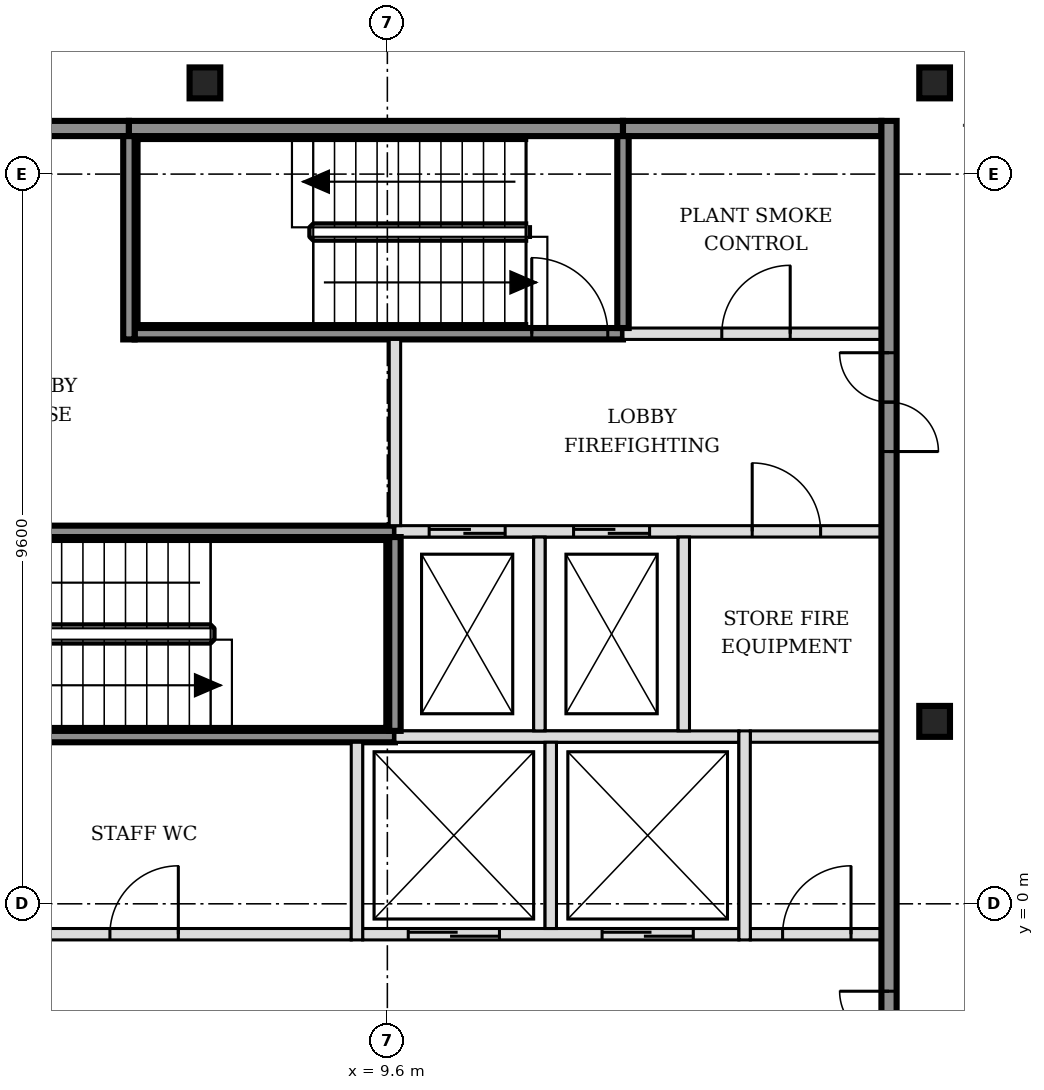
"""IFC4 building model, lengths in metres.
Left out: names, types, materials, properties, quantities, classifications, styles, units other than length and angle.
Written with IfcOpenShell. Run it as: python <this file> out.ifc"""

import sys

from ifc_helpers import new_model, si_unit, direction, frame, frame_2d, origin, origin_2d, place, context, subcontext, project, spatial, rectangle, i_section, extrude, element, fill, save


model = new_model("IFC4")
c1 = context("Model", 3, precision=1e-05, world=origin(), true_north=direction((0.0, 1.0)))
c2 = subcontext(c1, "Body", "Model", "MODEL_VIEW")
j1 = project(units=[si_unit("LENGTHUNIT", "METRE"), si_unit("PLANEANGLEUNIT", "RADIAN")], contexts=[c1])
p1 = place(None, origin())
s1 = spatial("IfcSite", under=j1, at=p1, CompositionType="ELEMENT")
p2 = place(p1, origin())
s2 = spatial("IfcBuilding", under=s1, at=p2, CompositionType="ELEMENT")
p3 = place(p2, frame((0.0, 0.0, 225.0)))
s3 = spatial("IfcBuildingStorey", under=s2, at=p3, CompositionType="ELEMENT", Elevation=225.0)
for number, where, z_axis, x_axis in (
    (1, (16.8, 2.4, -0.15), (0.0, 0.0, 1.0), (1.0, 0.0, 0.0)),
    (2, (7.2, 10.8, -0.15), (0.0, 0.0, 1.0), (1.0, 0.0, 0.0)),
    (3, (16.8, 10.8, -0.15), (0.0, 0.0, 1.0), (1.0, 0.0, 0.0)),
):
    element("IfcColumn", number, at=place(p3, frame(where, z_axis=z_axis, x_axis=x_axis)), inside=s3, PredefinedType="COLUMN", context=c2, shape_type="SweptSolid", body=[
        extrude(i_section(OverallWidth=0.404, OverallDepth=0.407, WebThickness=0.027, FlangeThickness=0.044, FilletRadius=0.015, at=origin_2d()), origin(), (0.0, 0.0, 1.0), 3.6),
    ])
p4 = place(p3, frame((-1.7, -0.4, 0.0), z_axis=(0.0, 0.0, 1.0), x_axis=(1.0, 0.0, 0.0)))
e4 = element("IfcWall", 4, at=p4, inside=s3, PredefinedType="PARTITIONING", context=c2, shape_type="SweptSolid", body=[
    extrude(rectangle(XDim=10.825, YDim=0.15, at=frame_2d((5.413, 0.0))), origin(), (0.0, 0.0, 1.0), 3.45),
])
p5 = place(p4, frame((2.15, 0.0, 0.0)))
e5 = element("IfcOpeningElement", 5, at=p5, cuts=e4, PredefinedType="OPENING", context=c2, shape_type="SweptSolid", body=[
    extrude(rectangle(XDim=0.9, YDim=2.1, at=frame_2d((0.45, 1.05))), frame((0.0, 0.085, 0.0), z_axis=(0.0, -1.0, 0.0), x_axis=(1.0, 0.0, 0.0)), (0.0, 0.0, 1.0), 0.17),
])
p6 = place(p4, frame((7.65, 0.0, 0.0)))
e6 = element("IfcOpeningElement", 6, at=p6, cuts=e4, PredefinedType="OPENING", context=c2, shape_type="SweptSolid", body=[
    extrude(rectangle(XDim=0.9, YDim=2.1, at=frame_2d((0.45, 1.05))), frame((0.0, 0.085, 0.0), z_axis=(0.0, -1.0, 0.0), x_axis=(1.0, 0.0, 0.0)), (0.0, 0.0, 1.0), 0.17),
])
p7 = place(p3, frame((9.275, -0.4, 0.0), z_axis=(0.0, 0.0, 1.0), x_axis=(1.0, 0.0, 0.0)))
e7 = element("IfcWall", 7, at=p7, inside=s3, PredefinedType="SOLIDWALL", context=c2, shape_type="SweptSolid", body=[
    extrude(rectangle(XDim=4.95, YDim=0.15, at=frame_2d((2.475, 0.0))), origin(), (0.0, 0.0, 1.0), 3.45),
])
p8 = place(p7, frame((0.6, 0.0, 0.0)))
e8 = element("IfcOpeningElement", 8, at=p8, cuts=e7, PredefinedType="OPENING", context=c2, shape_type="SweptSolid", body=[
    extrude(rectangle(XDim=1.2, YDim=2.1, at=frame_2d((0.6, 1.05))), frame((0.0, 0.085, 0.0), z_axis=(0.0, -1.0, 0.0), x_axis=(1.0, 0.0, 0.0)), (0.0, 0.0, 1.0), 0.17),
])
p9 = place(p7, frame((3.15, 0.0, 0.0)))
e9 = element("IfcOpeningElement", 9, at=p9, cuts=e7, PredefinedType="OPENING", context=c2, shape_type="SweptSolid", body=[
    extrude(rectangle(XDim=1.2, YDim=2.1, at=frame_2d((0.6, 1.05))), frame((0.0, 0.085, 0.0), z_axis=(0.0, -1.0, 0.0), x_axis=(1.0, 0.0, 0.0)), (0.0, 0.0, 1.0), 0.17),
])
p10 = place(p3, frame((14.375, -0.4, 0.0), z_axis=(0.0, 0.0, 1.0), x_axis=(1.0, 0.0, 0.0)))
e10 = element("IfcWall", 10, at=p10, inside=s3, PredefinedType="PARTITIONING", context=c2, shape_type="SweptSolid", body=[
    extrude(rectangle(XDim=1.725, YDim=0.15, at=frame_2d((0.863, 0.0))), origin(), (0.0, 0.0, 1.0), 3.45),
])
p11 = place(p10, frame((0.425, 0.0, 0.0)))
e11 = element("IfcOpeningElement", 11, at=p11, cuts=e10, PredefinedType="OPENING", context=c2, shape_type="SweptSolid", body=[
    extrude(rectangle(XDim=0.9, YDim=2.1, at=frame_2d((0.45, 1.05))), frame((0.0, 0.085, 0.0), z_axis=(0.0, -1.0, 0.0), x_axis=(1.0, 0.0, 0.0)), (0.0, 0.0, 1.0), 0.17),
])
p12 = place(p3, frame((3.2, 2.2, 0.0), z_axis=(0.0, 0.0, 1.0), x_axis=(1.0, 0.0, 0.0)))
e12 = element("IfcWall", 12, at=p12, inside=s3, PredefinedType="SOLIDWALL", context=c2, shape_type="SweptSolid", body=[
    extrude(rectangle(XDim=6.5, YDim=0.15, at=frame_2d((3.25, 0.0))), origin(), (0.0, 0.0, 1.0), 3.45),
])
p13 = place(p3, frame((9.7, 2.2, 0.0), z_axis=(0.0, 0.0, 1.0), x_axis=(1.0, 0.0, 0.0)))
e13 = element("IfcWall", 13, at=p13, inside=s3, PredefinedType="SOLIDWALL", context=c2, shape_type="SweptSolid", body=[
    extrude(rectangle(XDim=4.525, YDim=0.15, at=frame_2d((2.263, 0.0))), origin(), (0.0, 0.0, 1.0), 3.45),
])
p14 = place(p3, frame((14.375, 2.2, 0.0), z_axis=(0.0, 0.0, 1.0), x_axis=(1.0, 0.0, 0.0)))
e14 = element("IfcWall", 14, at=p14, inside=s3, PredefinedType="PARTITIONING", context=c2, shape_type="SweptSolid", body=[
    extrude(rectangle(XDim=1.725, YDim=0.15, at=frame_2d((0.863, 0.0))), origin(), (0.0, 0.0, 1.0), 3.45),
])
p15 = place(p3, frame((3.2, 4.9, 0.0), z_axis=(0.0, 0.0, 1.0), x_axis=(1.0, 0.0, 0.0)))
e15 = element("IfcWall", 15, at=p15, inside=s3, PredefinedType="SOLIDWALL", context=c2, shape_type="SweptSolid", body=[
    extrude(rectangle(XDim=6.5, YDim=0.15, at=frame_2d((3.25, 0.0))), origin(), (0.0, 0.0, 1.0), 3.45),
])
p16 = place(p15, frame((0.175, 0.0, 0.0)))
e16 = element("IfcOpeningElement", 16, at=p16, cuts=e15, PredefinedType="OPENING", context=c2, shape_type="SweptSolid", body=[
    extrude(rectangle(XDim=1.0, YDim=2.1, at=frame_2d((0.5, 1.05))), frame((0.0, 0.085, 0.0), z_axis=(0.0, -1.0, 0.0), x_axis=(1.0, 0.0, 0.0)), (0.0, 0.0, 1.0), 0.17),
])
p17 = place(p3, frame((9.7, 4.9, 0.0), z_axis=(0.0, 0.0, 1.0), x_axis=(1.0, 0.0, 0.0)))
e17 = element("IfcWall", 17, at=p17, inside=s3, PredefinedType="SOLIDWALL", context=c2, shape_type="SweptSolid", body=[
    extrude(rectangle(XDim=6.4, YDim=0.15, at=frame_2d((3.2, 0.0))), origin(), (0.0, 0.0, 1.0), 3.45),
])
p18 = place(p17, frame((0.45, 0.0, 0.0)))
e18 = element("IfcOpeningElement", 18, at=p18, cuts=e17, PredefinedType="OPENING", context=c2, shape_type="SweptSolid", body=[
    extrude(rectangle(XDim=1.0, YDim=2.1, at=frame_2d((0.5, 1.05))), frame((0.0, 0.085, 0.0), z_axis=(0.0, -1.0, 0.0), x_axis=(1.0, 0.0, 0.0)), (0.0, 0.0, 1.0), 0.17),
])
p19 = place(p17, frame((2.35, 0.0, 0.0)))
e19 = element("IfcOpeningElement", 19, at=p19, cuts=e17, PredefinedType="OPENING", context=c2, shape_type="SweptSolid", body=[
    extrude(rectangle(XDim=1.0, YDim=2.1, at=frame_2d((0.5, 1.05))), frame((0.0, 0.085, 0.0), z_axis=(0.0, -1.0, 0.0), x_axis=(1.0, 0.0, 0.0)), (0.0, 0.0, 1.0), 0.17),
])
p20 = place(p17, frame((4.7, 0.0, 0.0)))
e20 = element("IfcOpeningElement", 20, at=p20, cuts=e17, PredefinedType="OPENING", context=c2, shape_type="SweptSolid", body=[
    extrude(rectangle(XDim=0.9, YDim=2.1, at=frame_2d((0.45, 1.05))), frame((0.0, 0.085, 0.0), z_axis=(0.0, -1.0, 0.0), x_axis=(1.0, 0.0, 0.0)), (0.0, 0.0, 1.0), 0.17),
])
p21 = place(p3, frame((6.275, 7.5, 0.0), z_axis=(0.0, 0.0, 1.0), x_axis=(1.0, 0.0, 0.0)))
e21 = element("IfcWall", 21, at=p21, inside=s3, PredefinedType="SOLIDWALL", context=c2, shape_type="SweptSolid", body=[
    extrude(rectangle(XDim=6.425, YDim=0.15, at=frame_2d((3.212, 0.0))), origin(), (0.0, 0.0, 1.0), 3.45),
])
p22 = place(p21, frame((5.225, 0.0, 0.0)))
e22 = element("IfcOpeningElement", 22, at=p22, cuts=e21, PredefinedType="OPENING", context=c2, shape_type="SweptSolid", body=[
    extrude(rectangle(XDim=1.0, YDim=2.1, at=frame_2d((0.5, 1.05))), frame((0.0, 0.085, 0.0), z_axis=(0.0, -1.0, 0.0), x_axis=(1.0, 0.0, 0.0)), (0.0, 0.0, 1.0), 0.17),
])
p23 = place(p3, frame((12.7, 7.5, 0.0), z_axis=(0.0, 0.0, 1.0), x_axis=(1.0, 0.0, 0.0)))
e23 = element("IfcWall", 23, at=p23, inside=s3, PredefinedType="SOLIDWALL", context=c2, shape_type="SweptSolid", body=[
    extrude(rectangle(XDim=3.4, YDim=0.15, at=frame_2d((1.7, 0.0))), origin(), (0.0, 0.0, 1.0), 3.45),
])
p24 = place(p23, frame((1.3, 0.0, 0.0)))
e24 = element("IfcOpeningElement", 24, at=p24, cuts=e23, PredefinedType="OPENING", context=c2, shape_type="SweptSolid", body=[
    extrude(rectangle(XDim=0.9, YDim=2.1, at=frame_2d((0.45, 1.05))), frame((0.0, 0.085, 0.0), z_axis=(0.0, -1.0, 0.0), x_axis=(1.0, 0.0, 0.0)), (0.0, 0.0, 1.0), 0.17),
])
p25 = place(p3, frame((-1.7, 10.2, 0.0), z_axis=(0.0, 0.0, 1.0), x_axis=(1.0, 0.0, 0.0)))
e25 = element("IfcWall", 25, at=p25, inside=s3, PredefinedType="SOLIDWALL", context=c2, shape_type="SweptSolid", body=[
    extrude(rectangle(XDim=7.9, YDim=0.2, at=frame_2d((3.95, 0.0))), origin(), (0.0, 0.0, 1.0), 3.45),
])
p26 = place(p3, frame((6.2, 10.2, 0.0), z_axis=(0.0, 0.0, 1.0), x_axis=(1.0, 0.0, 0.0)))
e26 = element("IfcWall", 26, at=p26, inside=s3, PredefinedType="SOLIDWALL", context=c2, shape_type="SweptSolid", body=[
    extrude(rectangle(XDim=6.5, YDim=0.2, at=frame_2d((3.25, 0.0))), origin(), (0.0, 0.0, 1.0), 3.45),
])
p27 = place(p3, frame((12.7, 10.2, 0.0), z_axis=(0.0, 0.0, 1.0), x_axis=(1.0, 0.0, 0.0)))
e27 = element("IfcWall", 27, at=p27, inside=s3, PredefinedType="SOLIDWALL", context=c2, shape_type="SweptSolid", body=[
    extrude(rectangle(XDim=3.4, YDim=0.2, at=frame_2d((1.7, 0.0))), origin(), (0.0, 0.0, 1.0), 3.45),
])
p28 = place(p3, frame((6.2, 7.425, 0.0), z_axis=(0.0, 0.0, 1.0), x_axis=(0.0, 1.0, 0.0)))
e28 = element("IfcWall", 28, at=p28, inside=s3, PredefinedType="SOLIDWALL", context=c2, shape_type="SweptSolid", body=[
    extrude(rectangle(XDim=2.675, YDim=0.15, at=frame_2d((1.337, 0.0))), origin(), (0.0, 0.0, 1.0), 3.45),
])
p29 = place(p3, frame((9.2, -0.475, 0.0), z_axis=(0.0, 0.0, 1.0), x_axis=(0.0, 1.0, 0.0)))
e29 = element("IfcWall", 29, at=p29, inside=s3, PredefinedType="SOLIDWALL", context=c2, shape_type="SweptSolid", body=[
    extrude(rectangle(XDim=2.6, YDim=0.15, at=frame_2d((1.3, 0.0))), origin(), (0.0, 0.0, 1.0), 3.45),
])
p30 = place(p3, frame((9.7, 2.275, 0.0), z_axis=(0.0, 0.0, 1.0), x_axis=(0.0, 1.0, 0.0)))
e30 = element("IfcWall", 30, at=p30, inside=s3, PredefinedType="SOLIDWALL", context=c2, shape_type="SweptSolid", body=[
    extrude(rectangle(XDim=2.55, YDim=0.15, at=frame_2d((1.275, 0.0))), origin(), (0.0, 0.0, 1.0), 3.45),
])
p31 = place(p3, frame((9.7, 4.975, 0.0), z_axis=(0.0, 0.0, 1.0), x_axis=(0.0, 1.0, 0.0)))
e31 = element("IfcWall", 31, at=p31, inside=s3, PredefinedType="SOLIDWALL", context=c2, shape_type="SweptSolid", body=[
    extrude(rectangle(XDim=2.45, YDim=0.15, at=frame_2d((1.225, 0.0))), origin(), (0.0, 0.0, 1.0), 3.45),
])
p32 = place(p3, frame((11.6, 2.275, 0.0), z_axis=(0.0, 0.0, 1.0), x_axis=(0.0, 1.0, 0.0)))
e32 = element("IfcWall", 32, at=p32, inside=s3, PredefinedType="SOLIDWALL", context=c2, shape_type="SweptSolid", body=[
    extrude(rectangle(XDim=2.55, YDim=0.15, at=frame_2d((1.275, 0.0))), origin(), (0.0, 0.0, 1.0), 3.45),
])
p33 = place(p3, frame((11.75, -0.325, 0.0), z_axis=(0.0, 0.0, 1.0), x_axis=(0.0, 1.0, 0.0)))
e33 = element("IfcWall", 33, at=p33, inside=s3, PredefinedType="SOLIDWALL", context=c2, shape_type="SweptSolid", body=[
    extrude(rectangle(XDim=2.45, YDim=0.15, at=frame_2d((1.225, 0.0))), origin(), (0.0, 0.0, 1.0), 3.45),
])
p34 = place(p3, frame((12.7, 7.575, 0.0), z_axis=(0.0, 0.0, 1.0), x_axis=(0.0, 1.0, 0.0)))
e34 = element("IfcWall", 34, at=p34, inside=s3, PredefinedType="SOLIDWALL", context=c2, shape_type="SweptSolid", body=[
    extrude(rectangle(XDim=2.525, YDim=0.15, at=frame_2d((1.263, 0.0))), origin(), (0.0, 0.0, 1.0), 3.45),
])
p35 = place(p3, frame((13.5, 2.275, 0.0), z_axis=(0.0, 0.0, 1.0), x_axis=(0.0, 1.0, 0.0)))
e35 = element("IfcWall", 35, at=p35, inside=s3, PredefinedType="SOLIDWALL", context=c2, shape_type="SweptSolid", body=[
    extrude(rectangle(XDim=2.55, YDim=0.15, at=frame_2d((1.275, 0.0))), origin(), (0.0, 0.0, 1.0), 3.45),
])
p36 = place(p3, frame((14.3, -0.475, 0.0), z_axis=(0.0, 0.0, 1.0), x_axis=(0.0, 1.0, 0.0)))
e36 = element("IfcWall", 36, at=p36, inside=s3, PredefinedType="SOLIDWALL", context=c2, shape_type="SweptSolid", body=[
    extrude(rectangle(XDim=2.75, YDim=0.15, at=frame_2d((1.375, 0.0))), origin(), (0.0, 0.0, 1.0), 3.45),
])
p37 = place(p3, frame((16.2, -5.5, 0.0), z_axis=(0.0, 0.0, 1.0), x_axis=(0.0, 1.0, 0.0)))
e37 = element("IfcWall", 37, at=p37, inside=s3, PredefinedType="SOLIDWALL", context=c2, shape_type="SweptSolid", body=[
    extrude(rectangle(XDim=15.8, YDim=0.2, at=frame_2d((7.9, 0.0))), origin(), (0.0, 0.0, 1.0), 3.45),
])
p38 = place(p37, frame((3.05, 0.0, 0.0)))
e38 = element("IfcOpeningElement", 38, at=p38, cuts=e37, PredefinedType="OPENING", context=c2, shape_type="SweptSolid", body=[
    extrude(rectangle(XDim=1.3, YDim=2.1, at=frame_2d((0.65, 1.05))), frame((0.0, 0.11, 0.0), z_axis=(0.0, -1.0, 0.0), x_axis=(1.0, 0.0, 0.0)), (0.0, 0.0, 1.0), 0.22),
])
p39 = place(p37, frame((11.45, 0.0, 0.0)))
e39 = element("IfcOpeningElement", 39, at=p39, cuts=e37, PredefinedType="OPENING", context=c2, shape_type="SweptSolid", body=[
    extrude(rectangle(XDim=1.3, YDim=2.1, at=frame_2d((0.65, 1.05))), frame((0.0, 0.11, 0.0), z_axis=(0.0, -1.0, 0.0), x_axis=(1.0, 0.0, 0.0)), (0.0, 0.0, 1.0), 0.22),
])
p40 = place(p3, frame((16.722, -14.272, 0.0), z_axis=(0.0, 0.0, 1.0), x_axis=(0.707106781187, 0.707106781187, 0.0)))
e40 = element("IfcWall", 40, at=p40, inside=s3, PredefinedType="PARTITIONING", context=c2, shape_type="SweptSolid", body=[
    extrude(rectangle(XDim=20.049, YDim=0.15, at=frame_2d((10.025, 0.0))), origin(), (0.0, 0.0, 1.0), 2.73),
])
p41 = place(p40, frame((4.892, 0.0, 0.0)))
e41 = element("IfcOpeningElement", 41, at=p41, cuts=e40, PredefinedType="OPENING", context=c2, shape_type="SweptSolid", body=[
    extrude(rectangle(XDim=0.9, YDim=2.1, at=frame_2d((0.45, 1.05))), frame((0.0, 0.085, 0.0), z_axis=(0.0, -1.0, 0.0), x_axis=(1.0, 0.0, 0.0)), (0.0, 0.0, 1.0), 0.17),
])
p42 = place(p40, frame((10.042, 0.0, 0.0)))
e42 = element("IfcOpeningElement", 42, at=p42, cuts=e40, PredefinedType="OPENING", context=c2, shape_type="SweptSolid", body=[
    extrude(rectangle(XDim=0.9, YDim=2.1, at=frame_2d((0.45, 1.05))), frame((0.0, 0.085, 0.0), z_axis=(0.0, -1.0, 0.0), x_axis=(1.0, 0.0, 0.0)), (0.0, 0.0, 1.0), 0.17),
])
p43 = place(p40, frame((14.443, 0.0, 0.0)))
e43 = element("IfcOpeningElement", 43, at=p43, cuts=e40, PredefinedType="OPENING", context=c2, shape_type="SweptSolid", body=[
    extrude(rectangle(XDim=0.9, YDim=2.1, at=frame_2d((0.45, 1.05))), frame((0.0, 0.085, 0.0), z_axis=(0.0, -1.0, 0.0), x_axis=(1.0, 0.0, 0.0)), (0.0, 0.0, 1.0), 0.17),
])
p44 = place(p40, frame((17.837, 0.0, 0.0)))
e44 = element("IfcOpeningElement", 44, at=p44, cuts=e40, PredefinedType="OPENING", context=c2, shape_type="SweptSolid", body=[
    extrude(rectangle(XDim=0.9, YDim=2.1, at=frame_2d((0.45, 1.05))), frame((0.0, 0.085, 0.0), z_axis=(0.0, -1.0, 0.0), x_axis=(1.0, 0.0, 0.0)), (0.0, 0.0, 1.0), 0.17),
])
p45 = place(p8, origin())
e45 = element("IfcDoor", 45, at=p45, inside=s3, OperationType="DOUBLE_DOOR_SLIDING", PredefinedType="DOOR", context=c2, shape_type="SweptSolid", body=[
    extrude(rectangle(XDim=1.2, YDim=2.1, at=frame_2d((0.6, 1.05))), frame((0.0, 0.025, 0.0), z_axis=(0.0, -1.0, 0.0), x_axis=(1.0, 0.0, 0.0)), (0.0, 0.0, 1.0), 0.05),
])
fill(e8, e45)
p46 = place(p9, origin())
e46 = element("IfcDoor", 46, at=p46, inside=s3, OperationType="DOUBLE_DOOR_SLIDING", PredefinedType="DOOR", context=c2, shape_type="SweptSolid", body=[
    extrude(rectangle(XDim=1.2, YDim=2.1, at=frame_2d((0.6, 1.05))), frame((0.0, 0.025, 0.0), z_axis=(0.0, -1.0, 0.0), x_axis=(1.0, 0.0, 0.0)), (0.0, 0.0, 1.0), 0.05),
])
fill(e9, e46)
p47 = place(p18, origin())
e47 = element("IfcDoor", 47, at=p47, inside=s3, OperationType="DOUBLE_DOOR_SLIDING", PredefinedType="DOOR", context=c2, shape_type="SweptSolid", body=[
    extrude(rectangle(XDim=1.0, YDim=2.1, at=frame_2d((0.5, 1.05))), frame((0.0, 0.025, 0.0), z_axis=(0.0, -1.0, 0.0), x_axis=(1.0, 0.0, 0.0)), (0.0, 0.0, 1.0), 0.05),
])
fill(e18, e47)
p48 = place(p19, origin())
e48 = element("IfcDoor", 48, at=p48, inside=s3, OperationType="DOUBLE_DOOR_SLIDING", PredefinedType="DOOR", context=c2, shape_type="SweptSolid", body=[
    extrude(rectangle(XDim=1.0, YDim=2.1, at=frame_2d((0.5, 1.05))), frame((0.0, 0.025, 0.0), z_axis=(0.0, -1.0, 0.0), x_axis=(1.0, 0.0, 0.0)), (0.0, 0.0, 1.0), 0.05),
])
fill(e19, e48)
p49 = place(p22, origin())
e49 = element("IfcDoor", 49, at=p49, inside=s3, OperationType="SINGLE_SWING_LEFT", PredefinedType="DOOR", context=c2, shape_type="SweptSolid", body=[
    extrude(rectangle(XDim=1.0, YDim=2.1, at=frame_2d((0.5, 1.05))), frame((0.0, 0.025, 0.0), z_axis=(0.0, -1.0, 0.0), x_axis=(1.0, 0.0, 0.0)), (0.0, 0.0, 1.0), 0.05),
])
fill(e22, e49)
p50 = place(p38, origin())
e50 = element("IfcDoor", 50, at=p50, inside=s3, OperationType="DOUBLE_DOOR_SINGLE_SWING", PredefinedType="DOOR", context=c2, shape_type="SweptSolid", body=[
    extrude(rectangle(XDim=1.3, YDim=2.1, at=frame_2d((0.65, 1.05))), frame((0.0, 0.025, 0.0), z_axis=(0.0, -1.0, 0.0), x_axis=(1.0, 0.0, 0.0)), (0.0, 0.0, 1.0), 0.05),
])
fill(e38, e50)
p51 = place(p39, origin())
e51 = element("IfcDoor", 51, at=p51, inside=s3, OperationType="DOUBLE_DOOR_SINGLE_SWING", PredefinedType="DOOR", context=c2, shape_type="SweptSolid", body=[
    extrude(rectangle(XDim=1.3, YDim=2.1, at=frame_2d((0.65, 1.05))), frame((0.0, 0.025, 0.0), z_axis=(0.0, -1.0, 0.0), x_axis=(1.0, 0.0, 0.0)), (0.0, 0.0, 1.0), 0.05),
])
fill(e39, e51)
p52 = place(p11, origin())
e52 = element("IfcDoor", 52, at=p52, inside=s3, OperationType="SINGLE_SWING_RIGHT", PredefinedType="DOOR", context=c2, shape_type="SweptSolid", body=[
    extrude(rectangle(XDim=0.9, YDim=2.1, at=frame_2d((0.45, 1.05))), frame((0.0, 0.025, 0.0), z_axis=(0.0, -1.0, 0.0), x_axis=(1.0, 0.0, 0.0)), (0.0, 0.0, 1.0), 0.05),
])
fill(e11, e52)
p53 = place(p20, origin())
e53 = element("IfcDoor", 53, at=p53, inside=s3, OperationType="SINGLE_SWING_LEFT", PredefinedType="DOOR", context=c2, shape_type="SweptSolid", body=[
    extrude(rectangle(XDim=0.9, YDim=2.1, at=frame_2d((0.45, 1.05))), frame((0.0, 0.025, 0.0), z_axis=(0.0, -1.0, 0.0), x_axis=(1.0, 0.0, 0.0)), (0.0, 0.0, 1.0), 0.05),
])
fill(e20, e53)
p54 = place(p24, origin())
e54 = element("IfcDoor", 54, at=p54, inside=s3, OperationType="SINGLE_SWING_RIGHT", PredefinedType="DOOR", context=c2, shape_type="SweptSolid", body=[
    extrude(rectangle(XDim=0.9, YDim=2.1, at=frame_2d((0.45, 1.05))), frame((0.0, 0.025, 0.0), z_axis=(0.0, -1.0, 0.0), x_axis=(1.0, 0.0, 0.0)), (0.0, 0.0, 1.0), 0.05),
])
fill(e24, e54)
p55 = place(p6, origin())
e55 = element("IfcDoor", 55, at=p55, inside=s3, OperationType="SINGLE_SWING_RIGHT", PredefinedType="DOOR", context=c2, shape_type="SweptSolid", body=[
    extrude(rectangle(XDim=0.9, YDim=2.1, at=frame_2d((0.45, 1.05))), frame((0.0, 0.025, 0.0), z_axis=(0.0, -1.0, 0.0), x_axis=(1.0, 0.0, 0.0)), (0.0, 0.0, 1.0), 0.05),
])
fill(e6, e55)
save(model, sys.argv[1])
